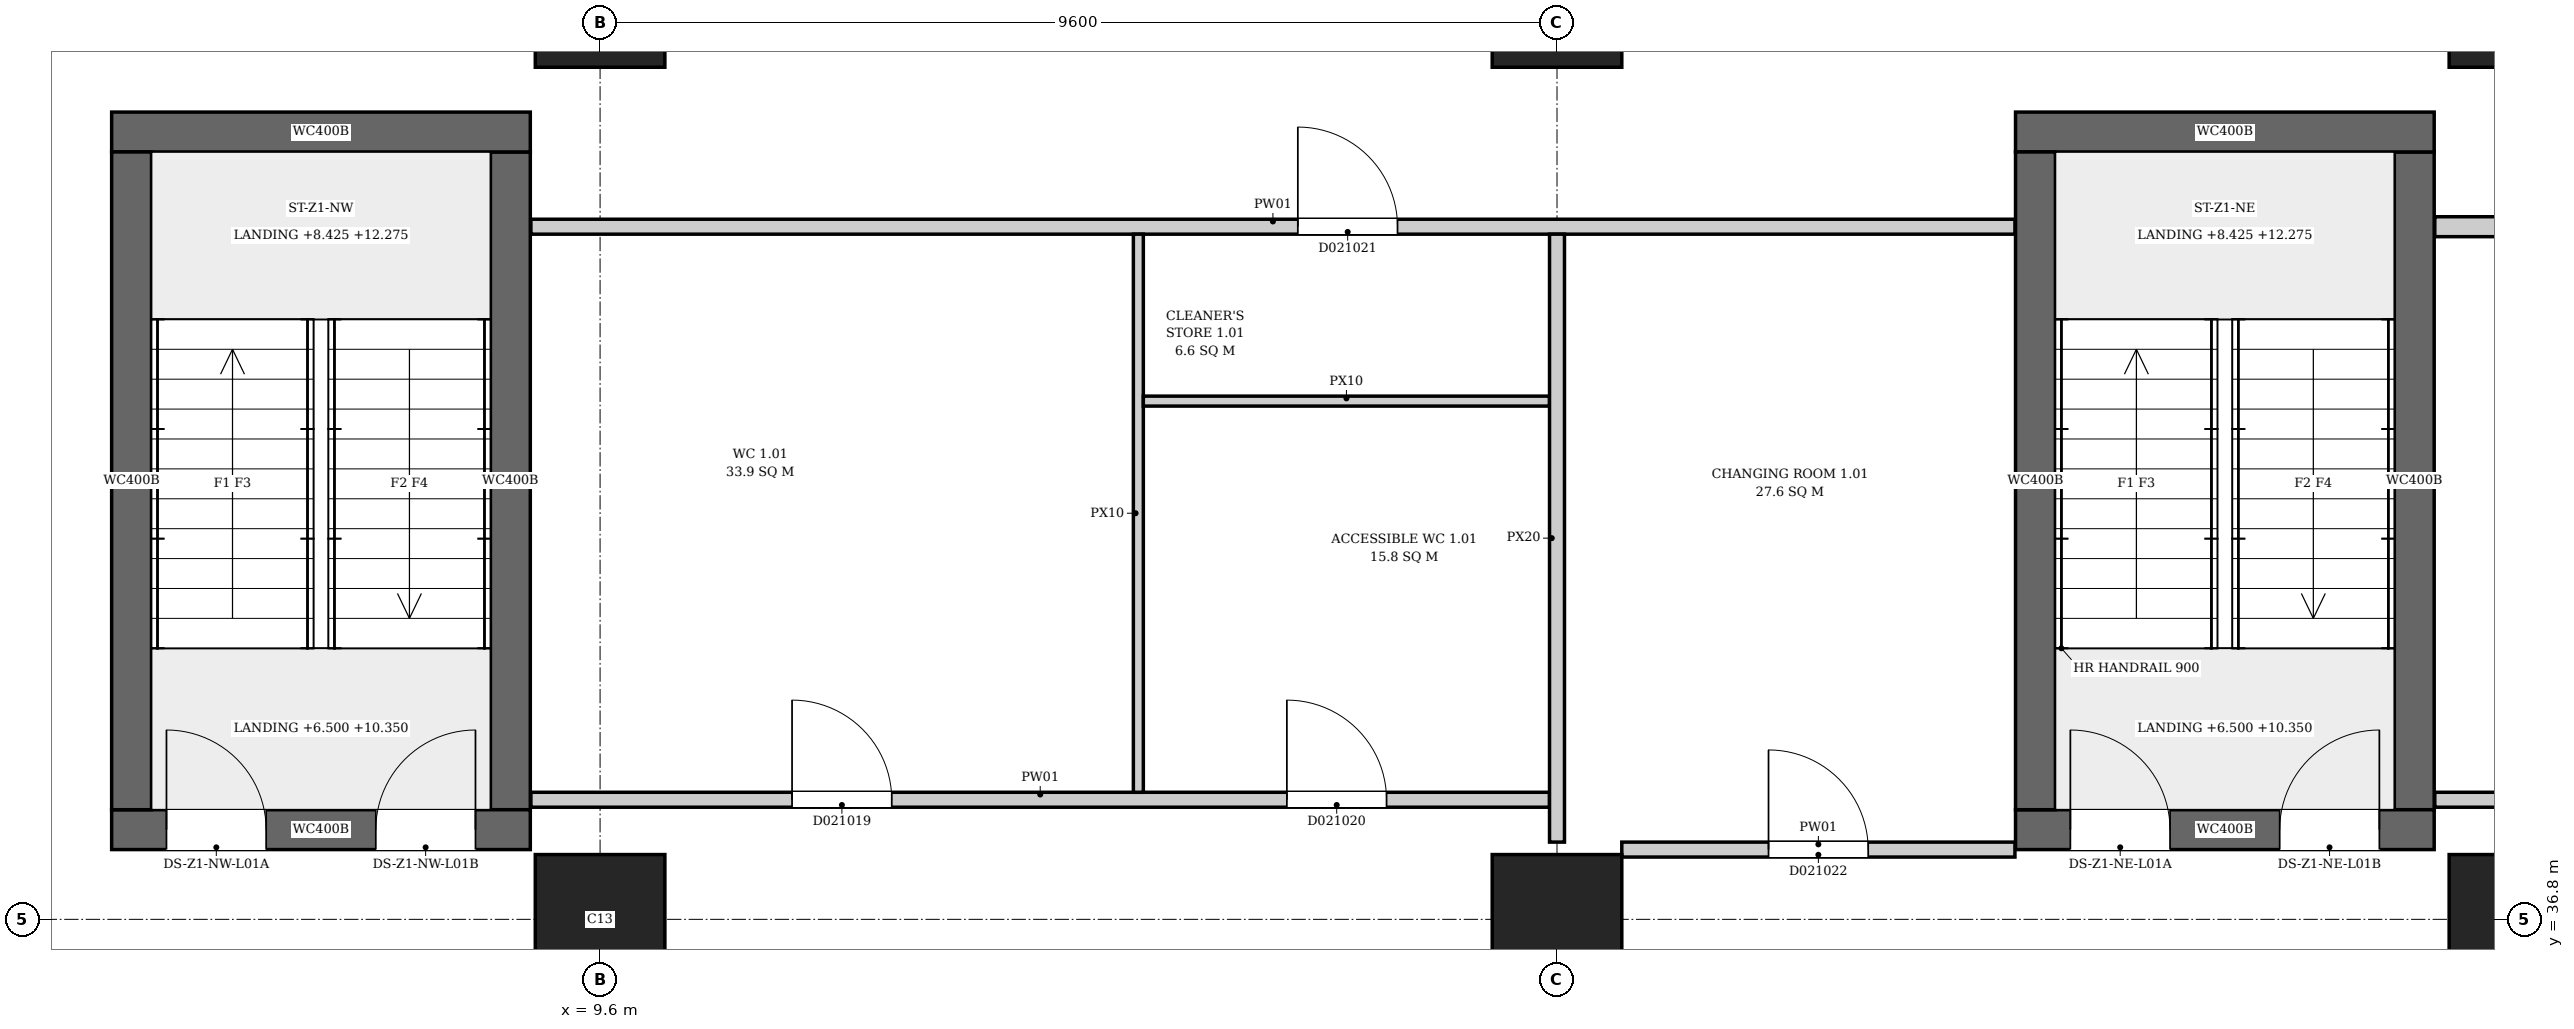
"""IFC4 building model, lengths in metres.
Left out: names, types, materials, properties, quantities, classifications, styles, units other than length and angle.
Written with IfcOpenShell. Run it as: python <this file> out.ifc"""

import sys

from ifc_helpers import new_model, si_unit, direction, frame, frame_2d, origin, origin_2d, place, context, subcontext, project, spatial, rectangle, extrude, element, fill, save


model = new_model("IFC4")
c1 = context("Model", 3, precision=1e-05, world=origin(), true_north=direction((0.0, 1.0)))
c2 = subcontext(c1, "Body", "Model", "MODEL_VIEW")
j1 = project(units=[si_unit("LENGTHUNIT", "METRE"), si_unit("PLANEANGLEUNIT", "RADIAN")], contexts=[c1])
p1 = place(None, origin())
s1 = spatial("IfcSite", under=j1, at=p1, CompositionType="ELEMENT")
p2 = place(p1, origin())
s2 = spatial("IfcBuilding", under=s1, at=p2, CompositionType="ELEMENT")
p3 = place(p2, frame((0.0, 0.0, 6.5)))
s3 = spatial("IfcBuildingStorey", under=s2, at=p3, CompositionType="ELEMENT", Elevation=6.5)
p4 = place(p3, frame((4.7, 37.7, 0.0), z_axis=(0.0, 0.0, 1.0), x_axis=(1.0, 0.0, 0.0)))
e1 = element("IfcWall", 1, at=p4, inside=s3, PredefinedType="SHEAR", context=c2, shape_type="SweptSolid", body=[
    extrude(rectangle(XDim=4.2, YDim=0.4, at=frame_2d((2.1, 0.0))), origin(), (0.0, 0.0, 1.0), 7.7),
])
p5 = place(p4, frame((0.55, 0.0, 0.0)))
e2 = element("IfcOpeningElement", 2, at=p5, cuts=e1, PredefinedType="OPENING", context=c2, shape_type="SweptSolid", body=[
    extrude(rectangle(XDim=1.0, YDim=2.1, at=frame_2d((0.5, 1.05))), frame((0.0, 0.21, 0.0), z_axis=(0.0, -1.0, 0.0), x_axis=(1.0, 0.0, 0.0)), (0.0, 0.0, 1.0), 0.42),
])
p6 = place(p4, frame((2.65, 0.0, 0.0)))
e3 = element("IfcOpeningElement", 3, at=p6, cuts=e1, PredefinedType="OPENING", context=c2, shape_type="SweptSolid", body=[
    extrude(rectangle(XDim=1.0, YDim=2.1, at=frame_2d((0.5, 1.05))), frame((0.0, 0.21, 0.0), z_axis=(0.0, -1.0, 0.0), x_axis=(1.0, 0.0, 0.0)), (0.0, 0.0, 1.0), 0.42),
])
p7 = place(p3, frame((4.7, 44.7, 0.0), z_axis=(0.0, 0.0, 1.0), x_axis=(1.0, 0.0, 0.0)))
e4 = element("IfcWall", 4, at=p7, inside=s3, PredefinedType="SHEAR", context=c2, shape_type="SweptSolid", body=[
    extrude(rectangle(XDim=4.2, YDim=0.4, at=frame_2d((2.1, 0.0))), origin(), (0.0, 0.0, 1.0), 7.7),
])
for number, where, z_axis, x_axis in (
    (5, (4.9, 37.9, 0.0), (0.0, 0.0, 1.0), (0.0, 1.0, 0.0)),
    (6, (8.7, 37.9, 0.0), (0.0, 0.0, 1.0), (0.0, 1.0, 0.0)),
):
    element("IfcWall", number, at=place(p3, frame(where, z_axis=z_axis, x_axis=x_axis)), inside=s3, PredefinedType="SHEAR", context=c2, shape_type="SweptSolid", body=[
        extrude(rectangle(XDim=6.6, YDim=0.4, at=frame_2d((3.3, 0.0))), origin(), (0.0, 0.0, 1.0), 7.7),
    ])
p8 = place(p3, frame((23.8, 37.7, 0.0), z_axis=(0.0, 0.0, 1.0), x_axis=(1.0, 0.0, 0.0)))
e7 = element("IfcWall", 7, at=p8, inside=s3, PredefinedType="SHEAR", context=c2, shape_type="SweptSolid", body=[
    extrude(rectangle(XDim=4.2, YDim=0.4, at=frame_2d((2.1, 0.0))), origin(), (0.0, 0.0, 1.0), 7.7),
])
p9 = place(p8, frame((0.55, 0.0, 0.0)))
e8 = element("IfcOpeningElement", 8, at=p9, cuts=e7, PredefinedType="OPENING", context=c2, shape_type="SweptSolid", body=[
    extrude(rectangle(XDim=1.0, YDim=2.1, at=frame_2d((0.5, 1.05))), frame((0.0, 0.21, 0.0), z_axis=(0.0, -1.0, 0.0), x_axis=(1.0, 0.0, 0.0)), (0.0, 0.0, 1.0), 0.42),
])
p10 = place(p8, frame((2.65, 0.0, 0.0)))
e9 = element("IfcOpeningElement", 9, at=p10, cuts=e7, PredefinedType="OPENING", context=c2, shape_type="SweptSolid", body=[
    extrude(rectangle(XDim=1.0, YDim=2.1, at=frame_2d((0.5, 1.05))), frame((0.0, 0.21, 0.0), z_axis=(0.0, -1.0, 0.0), x_axis=(1.0, 0.0, 0.0)), (0.0, 0.0, 1.0), 0.42),
])
p11 = place(p3, frame((23.8, 44.7, 0.0), z_axis=(0.0, 0.0, 1.0), x_axis=(1.0, 0.0, 0.0)))
e10 = element("IfcWall", 10, at=p11, inside=s3, PredefinedType="SHEAR", context=c2, shape_type="SweptSolid", body=[
    extrude(rectangle(XDim=4.2, YDim=0.4, at=frame_2d((2.1, 0.0))), origin(), (0.0, 0.0, 1.0), 7.7),
])
for number, where, z_axis, x_axis in (
    (11, (24.0, 37.9, 0.0), (0.0, 0.0, 1.0), (0.0, 1.0, 0.0)),
    (12, (27.8, 37.9, 0.0), (0.0, 0.0, 1.0), (0.0, 1.0, 0.0)),
):
    element("IfcWall", number, at=place(p3, frame(where, z_axis=z_axis, x_axis=x_axis)), inside=s3, PredefinedType="SHEAR", context=c2, shape_type="SweptSolid", body=[
        extrude(rectangle(XDim=6.6, YDim=0.4, at=frame_2d((3.3, 0.0))), origin(), (0.0, 0.0, 1.0), 7.7),
    ])
for number, where, z_axis, x_axis in (
    (13, (9.6, 36.8, 0.0), (0.0, 0.0, 1.0), (1.0, 0.0, 0.0)),
    (14, (19.2, 36.8, 0.0), (0.0, 0.0, 1.0), (1.0, 0.0, 0.0)),
    (15, (28.8, 36.8, 0.0), (0.0, 0.0, 1.0), (1.0, 0.0, 0.0)),
    (16, (9.6, 46.0, 0.0), (0.0, 0.0, 1.0), (1.0, 0.0, 0.0)),
    (17, (19.2, 46.0, 0.0), (0.0, 0.0, 1.0), (1.0, 0.0, 0.0)),
    (18, (28.8, 46.0, 0.0), (0.0, 0.0, 1.0), (1.0, 0.0, 0.0)),
):
    element("IfcColumn", number, at=place(p3, frame(where, z_axis=z_axis, x_axis=x_axis)), inside=s3, PredefinedType="COLUMN", context=c2, shape_type="SweptSolid", body=[
        extrude(rectangle(XDim=1.3, YDim=1.3, at=origin_2d()), origin(), (0.0, 0.0, 1.0), 7.7),
    ])
p12 = place(p3, frame((8.906, 38.0, 0.0), z_axis=(0.0, 0.0, 1.0), x_axis=(1.0, 0.0, 0.0)))
e19 = element("IfcWall", 19, at=p12, inside=s3, PredefinedType="PARTITIONING", context=c2, shape_type="SweptSolid", body=[
    extrude(rectangle(XDim=10.219, YDim=0.15, at=frame_2d((5.109, 0.0))), origin(), (0.0, 0.0, 1.0), 7.35),
])
p13 = place(p12, frame((2.62, 0.0, 0.0)))
e20 = element("IfcOpeningElement", 20, at=p13, cuts=e19, PredefinedType="OPENING", context=c2, shape_type="SweptSolid", body=[
    extrude(rectangle(XDim=1.0, YDim=2.1, at=frame_2d((0.5, 1.05))), frame((0.0, 0.085, 0.0), z_axis=(0.0, -1.0, 0.0), x_axis=(1.0, 0.0, 0.0)), (0.0, 0.0, 1.0), 0.17),
])
p14 = place(p12, frame((7.584, 0.0, 0.0)))
e21 = element("IfcOpeningElement", 21, at=p14, cuts=e19, PredefinedType="OPENING", context=c2, shape_type="SweptSolid", body=[
    extrude(rectangle(XDim=1.0, YDim=2.1, at=frame_2d((0.5, 1.05))), frame((0.0, 0.085, 0.0), z_axis=(0.0, -1.0, 0.0), x_axis=(1.0, 0.0, 0.0)), (0.0, 0.0, 1.0), 0.17),
])
p15 = place(p3, frame((8.906, 43.75, 0.0), z_axis=(0.0, 0.0, 1.0), x_axis=(1.0, 0.0, 0.0)))
e22 = element("IfcWall", 22, at=p15, inside=s3, PredefinedType="PARTITIONING", context=c2, shape_type="SweptSolid", body=[
    extrude(rectangle(XDim=14.888, YDim=0.15, at=frame_2d((7.444, 0.0))), origin(), (0.0, 0.0, 1.0), 7.35),
])
p16 = place(p15, frame((7.694, 0.0, 0.0)))
e23 = element("IfcOpeningElement", 23, at=p16, cuts=e22, PredefinedType="OPENING", context=c2, shape_type="SweptSolid", body=[
    extrude(rectangle(XDim=1.0, YDim=2.1, at=frame_2d((0.5, 1.05))), frame((0.0, 0.085, 0.0), z_axis=(0.0, -1.0, 0.0), x_axis=(1.0, 0.0, 0.0)), (0.0, 0.0, 1.0), 0.17),
])
p17 = place(p3, frame((15.0, 38.075, 0.0), z_axis=(0.0, 0.0, 1.0), x_axis=(0.0, 1.0, 0.0)))
e24 = element("IfcWall", 24, at=p17, inside=s3, PredefinedType="PARTITIONING", context=c2, shape_type="SweptSolid", body=[
    extrude(rectangle(XDim=5.6, YDim=0.1, at=frame_2d((2.8, 0.0))), origin(), (0.0, 0.0, 1.0), 7.35),
])
p18 = place(p3, frame((15.05, 42.0, 0.0), z_axis=(0.0, 0.0, 1.0), x_axis=(1.0, 0.0, 0.0)))
e25 = element("IfcWall", 25, at=p18, inside=s3, PredefinedType="PARTITIONING", context=c2, shape_type="SweptSolid", body=[
    extrude(rectangle(XDim=4.075, YDim=0.1, at=frame_2d((2.038, 0.0))), origin(), (0.0, 0.0, 1.0), 7.35),
])
p19 = place(p3, frame((19.2, 37.575, 0.0), z_axis=(0.0, 0.0, 1.0), x_axis=(0.0, 1.0, 0.0)))
e26 = element("IfcWall", 26, at=p19, inside=s3, PredefinedType="PARTITIONING", context=c2, shape_type="SweptSolid", body=[
    extrude(rectangle(XDim=6.1, YDim=0.15, at=frame_2d((3.05, 0.0))), origin(), (0.0, 0.0, 1.0), 6.95),
])
p20 = place(p3, frame((19.85, 37.5, 0.0), z_axis=(0.0, 0.0, 1.0), x_axis=(1.0, 0.0, 0.0)))
e27 = element("IfcWall", 27, at=p20, inside=s3, PredefinedType="PARTITIONING", context=c2, shape_type="SweptSolid", body=[
    extrude(rectangle(XDim=3.944, YDim=0.15, at=frame_2d((1.972, 0.0))), origin(), (0.0, 0.0, 1.0), 7.35),
])
p21 = place(p20, frame((1.472, 0.0, 0.0)))
e28 = element("IfcOpeningElement", 28, at=p21, cuts=e27, PredefinedType="OPENING", context=c2, shape_type="SweptSolid", body=[
    extrude(rectangle(XDim=1.0, YDim=2.1, at=frame_2d((0.5, 1.05))), frame((0.0, 0.085, 0.0), z_axis=(0.0, -1.0, 0.0), x_axis=(1.0, 0.0, 0.0)), (0.0, 0.0, 1.0), 0.17),
])
p22 = place(p3, frame((28.006, 38.0, 0.0), z_axis=(0.0, 0.0, 1.0), x_axis=(1.0, 0.0, 0.0)))
e29 = element("IfcWall", 29, at=p22, inside=s3, PredefinedType="PARTITIONING", context=c2, shape_type="SweptSolid", body=[
    extrude(rectangle(XDim=1.894, YDim=0.15, at=frame_2d((0.947, 0.0))), origin(), (0.0, 0.0, 1.0), 7.35),
])
p23 = place(p3, frame((28.006, 43.75, 0.0), z_axis=(0.0, 0.0, 1.0), x_axis=(1.0, 0.0, 0.0)))
e30 = element("IfcWall", 30, at=p23, inside=s3, PredefinedType="PARTITIONING", context=c2, shape_type="SweptSolid", body=[
    extrude(rectangle(XDim=29.388, YDim=0.2, at=frame_2d((14.694, 0.0))), origin(), (0.0, 0.0, 1.0), 7.35),
])
p24 = place(p5, origin())
e31 = element("IfcDoor", 31, at=p24, inside=s3, OperationType="SINGLE_SWING_RIGHT", PredefinedType="DOOR", context=c2, shape_type="SweptSolid", body=[
    extrude(rectangle(XDim=1.0, YDim=2.1, at=frame_2d((0.5, 1.05))), frame((0.0, 0.025, 0.0), z_axis=(0.0, -1.0, 0.0), x_axis=(1.0, 0.0, 0.0)), (0.0, 0.0, 1.0), 0.05),
])
fill(e2, e31)
p25 = place(p6, origin())
e32 = element("IfcDoor", 32, at=p25, inside=s3, OperationType="SINGLE_SWING_LEFT", PredefinedType="DOOR", context=c2, shape_type="SweptSolid", body=[
    extrude(rectangle(XDim=1.0, YDim=2.1, at=frame_2d((0.5, 1.05))), frame((0.0, 0.025, 0.0), z_axis=(0.0, -1.0, 0.0), x_axis=(1.0, 0.0, 0.0)), (0.0, 0.0, 1.0), 0.05),
])
fill(e3, e32)
p26 = place(p9, origin())
e33 = element("IfcDoor", 33, at=p26, inside=s3, OperationType="SINGLE_SWING_RIGHT", PredefinedType="DOOR", context=c2, shape_type="SweptSolid", body=[
    extrude(rectangle(XDim=1.0, YDim=2.1, at=frame_2d((0.5, 1.05))), frame((0.0, 0.025, 0.0), z_axis=(0.0, -1.0, 0.0), x_axis=(1.0, 0.0, 0.0)), (0.0, 0.0, 1.0), 0.05),
])
fill(e8, e33)
p27 = place(p10, origin())
e34 = element("IfcDoor", 34, at=p27, inside=s3, OperationType="SINGLE_SWING_LEFT", PredefinedType="DOOR", context=c2, shape_type="SweptSolid", body=[
    extrude(rectangle(XDim=1.0, YDim=2.1, at=frame_2d((0.5, 1.05))), frame((0.0, 0.025, 0.0), z_axis=(0.0, -1.0, 0.0), x_axis=(1.0, 0.0, 0.0)), (0.0, 0.0, 1.0), 0.05),
])
fill(e9, e34)
p28 = place(p13, origin())
e35 = element("IfcDoor", 35, at=p28, inside=s3, OperationType="SINGLE_SWING_LEFT", PredefinedType="DOOR", context=c2, shape_type="SweptSolid", body=[
    extrude(rectangle(XDim=1.0, YDim=2.1, at=frame_2d((0.5, 1.05))), frame((0.0, 0.025, 0.0), z_axis=(0.0, -1.0, 0.0), x_axis=(1.0, 0.0, 0.0)), (0.0, 0.0, 1.0), 0.05),
])
fill(e20, e35)
p29 = place(p14, origin())
e36 = element("IfcDoor", 36, at=p29, inside=s3, OperationType="SINGLE_SWING_RIGHT", PredefinedType="DOOR", context=c2, shape_type="SweptSolid", body=[
    extrude(rectangle(XDim=1.0, YDim=2.1, at=frame_2d((0.5, 1.05))), frame((0.0, 0.025, 0.0), z_axis=(0.0, -1.0, 0.0), x_axis=(1.0, 0.0, 0.0)), (0.0, 0.0, 1.0), 0.05),
])
fill(e21, e36)
p30 = place(p16, origin())
e37 = element("IfcDoor", 37, at=p30, inside=s3, OperationType="SINGLE_SWING_LEFT", PredefinedType="DOOR", context=c2, shape_type="SweptSolid", body=[
    extrude(rectangle(XDim=1.0, YDim=2.1, at=frame_2d((0.5, 1.05))), frame((0.0, 0.025, 0.0), z_axis=(0.0, -1.0, 0.0), x_axis=(1.0, 0.0, 0.0)), (0.0, 0.0, 1.0), 0.05),
])
fill(e23, e37)
p31 = place(p21, origin())
e38 = element("IfcDoor", 38, at=p31, inside=s3, OperationType="SINGLE_SWING_LEFT", PredefinedType="DOOR", context=c2, shape_type="SweptSolid", body=[
    extrude(rectangle(XDim=1.0, YDim=2.1, at=frame_2d((0.5, 1.05))), frame((0.0, 0.025, 0.0), z_axis=(0.0, -1.0, 0.0), x_axis=(1.0, 0.0, 0.0)), (0.0, 0.0, 1.0), 0.05),
])
fill(e28, e38)
save(model, sys.argv[1])
